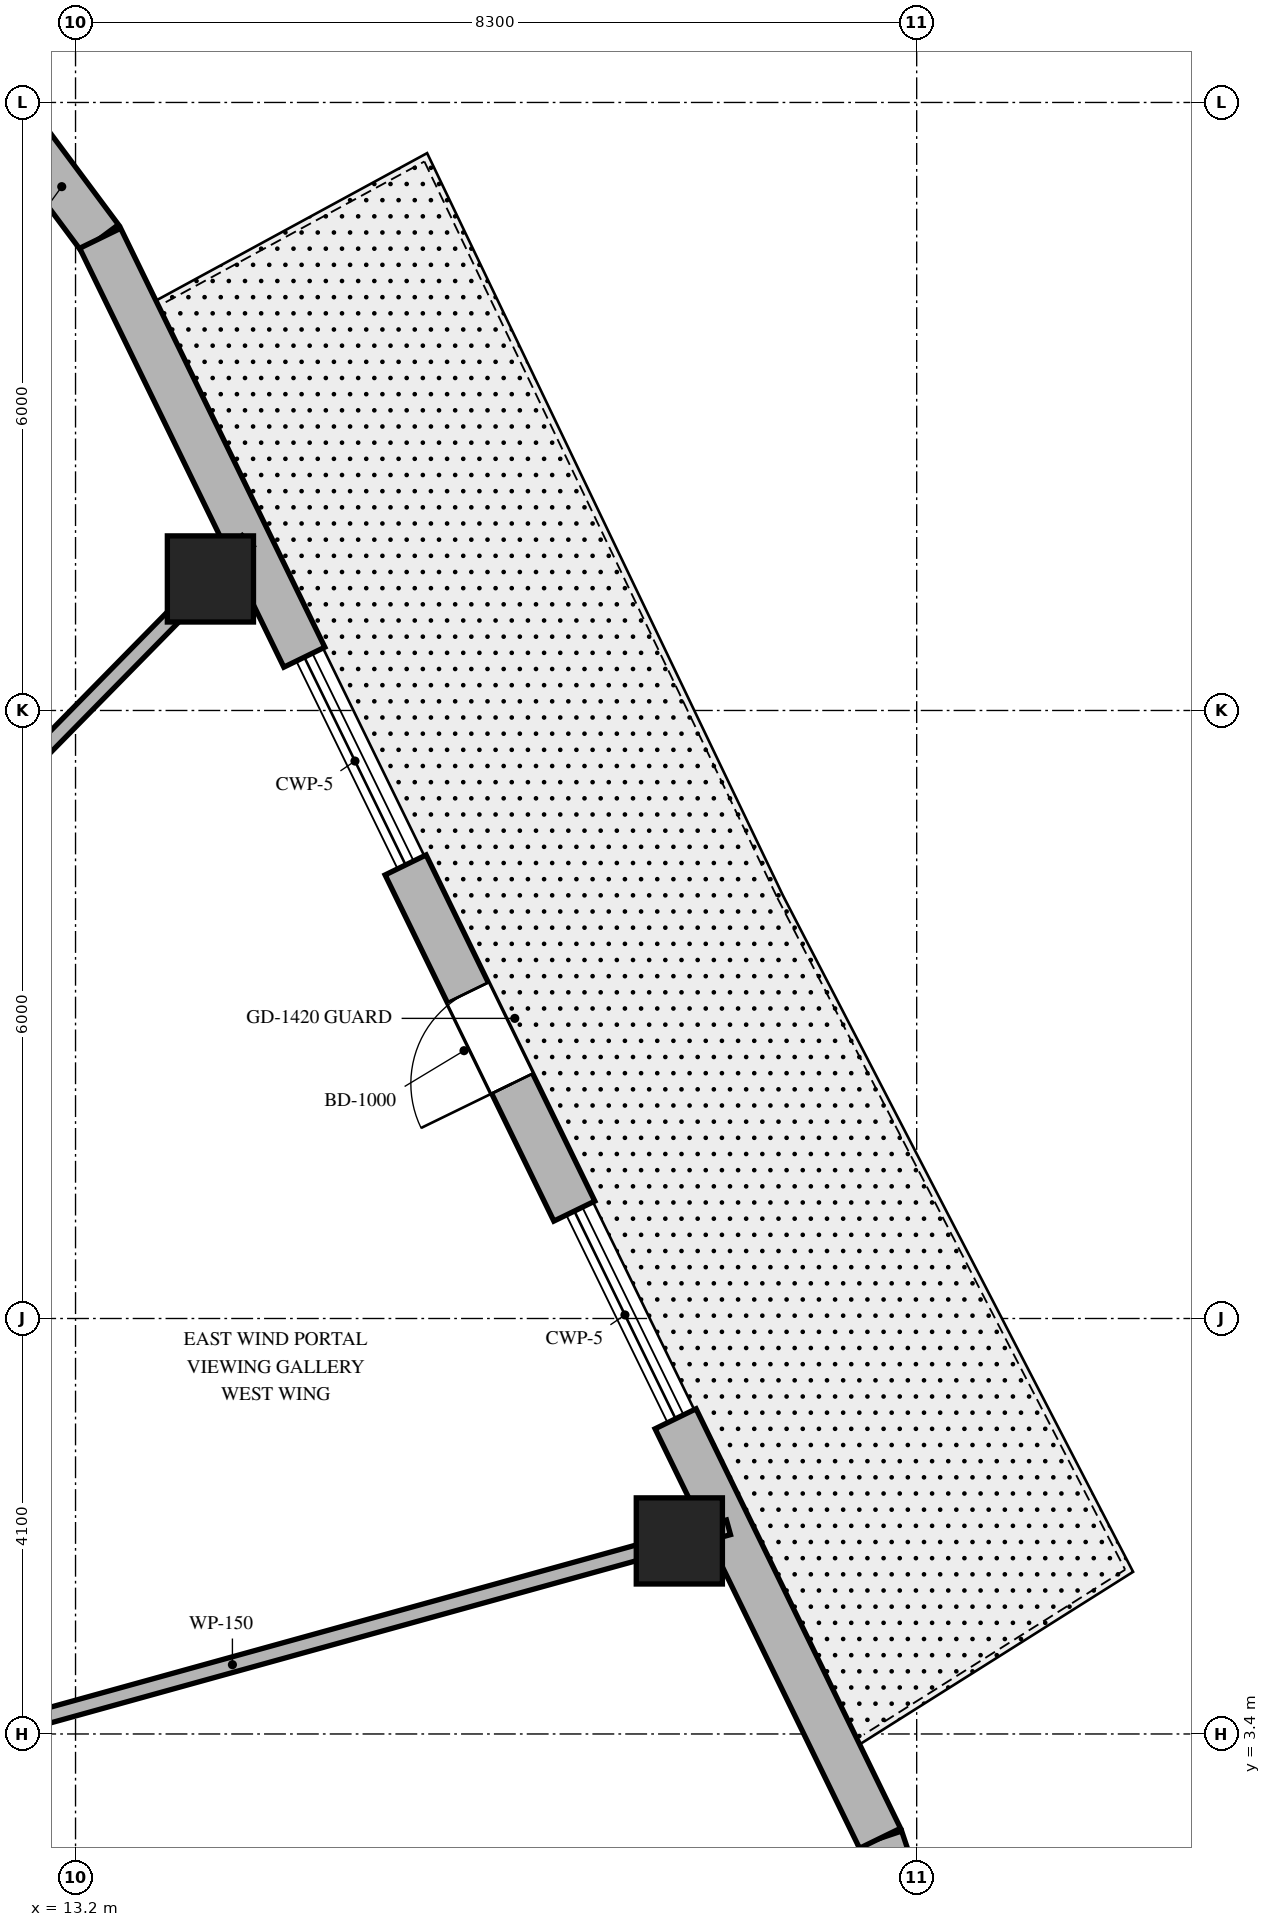
"""IFC4 building model, lengths in metres.
Left out: names, types, materials, properties, quantities, classifications, styles, units other than length and angle.
Written with IfcOpenShell. Run it as: python <this file> out.ifc"""

import sys

from ifc_helpers import new_model, si_unit, direction, frame, frame_2d, origin, origin_2d, place, context, subcontext, project, spatial, rectangle, extrude, element, fill, save


model = new_model("IFC4")
c1 = context("Model", 3, precision=1e-05, world=origin(), true_north=direction((0.0, 1.0)))
c2 = subcontext(c1, "Body", "Model", "MODEL_VIEW")
j1 = project(units=[si_unit("LENGTHUNIT", "METRE"), si_unit("PLANEANGLEUNIT", "RADIAN")], contexts=[c1])
p1 = place(None, origin())
s1 = spatial("IfcSite", under=j1, at=p1, CompositionType="ELEMENT")
p2 = place(p1, origin())
s2 = spatial("IfcBuilding", under=s1, at=p2, CompositionType="ELEMENT")
p3 = place(p2, frame((0.0, 0.0, 288.6)))
s3 = spatial("IfcBuildingStorey", under=s2, at=p3, CompositionType="ELEMENT", Elevation=288.6)
for number, where, z_axis, x_axis in (
    (1, (19.158, 5.305, 0.0), (0.0, 0.0, 1.0), (1.0, 0.0, 0.0)),
    (2, (14.531, 14.798, 0.0), (0.0, 0.0, 1.0), (1.0, 0.0, 0.0)),
):
    element("IfcColumn", number, at=place(p3, frame(where, z_axis=z_axis, x_axis=x_axis)), inside=s3, PredefinedType="COLUMN", context=c2, shape_type="SweptSolid", body=[
        extrude(rectangle(XDim=0.85, YDim=0.85, at=origin_2d()), origin(), (0.0, 0.0, 1.0), 4.5),
    ])
p4 = place(p3, frame((21.422, 1.522, 0.0), z_axis=(0.0, 0.0, 1.0), x_axis=(-0.316964162323, 0.94843751497, 0.0)))
e3 = element("IfcWall", 3, at=p4, inside=s3, PredefinedType="SOLIDWALL", context=c2, shape_type="SweptSolid", body=[
    extrude(rectangle(XDim=0.895, YDim=0.45, at=frame_2d((0.448, 0.0))), origin(), (0.0, 0.0, 1.0), 4.18),
])
p5 = place(p3, frame((13.443, 18.16, 0.0), z_axis=(0.0, 0.0, 1.0), x_axis=(-0.597042425808, 0.802209661987, 0.0)))
e4 = element("IfcWall", 4, at=p5, inside=s3, PredefinedType="SOLIDWALL", context=c2, shape_type="SweptSolid", body=[
    extrude(rectangle(XDim=1.27, YDim=0.45, at=frame_2d((0.635, 0.0))), origin(), (0.0, 0.0, 1.0), 4.18),
])
p6 = place(p3, frame((21.138, 2.371, 0.0), z_axis=(0.0, 0.0, 1.0), x_axis=(-0.438135313339, 0.898909031663, 0.0)))
e5 = element("IfcWall", 5, at=p6, inside=s3, PredefinedType="SOLIDWALL", context=c2, shape_type="SweptSolid", body=[
    extrude(rectangle(XDim=4.605, YDim=0.45, at=frame_2d((2.302, 0.0))), origin(), (0.0, 0.0, 1.0), 4.18),
])
p7 = place(p3, frame((18.122, 8.56, 0.0), z_axis=(0.0, 0.0, 1.0), x_axis=(-0.438118536586, 0.89891720859, 0.0)))
e6 = element("IfcWall", 6, at=p7, inside=s3, PredefinedType="SOLIDWALL", context=c2, shape_type="SweptSolid", body=[
    extrude(rectangle(XDim=3.8, YDim=0.45, at=frame_2d((1.9, 0.0))), origin(), (0.0, 0.0, 1.0), 4.18),
])
p8 = place(p7, frame((1.4, 0.0, 0.0)))
e7 = element("IfcOpeningElement", 7, at=p8, cuts=e6, PredefinedType="OPENING", context=c2, shape_type="SweptSolid", body=[
    extrude(rectangle(XDim=1.0, YDim=2.15, at=frame_2d((0.5, 1.075))), frame((0.0, 0.235, 0.0), z_axis=(0.0, -1.0, 0.0), x_axis=(1.0, 0.0, 0.0)), (0.0, 0.0, 1.0), 0.47),
])
p9 = place(p3, frame((15.458, 14.026, 0.0), z_axis=(0.0, 0.0, 1.0), x_axis=(-0.438101439155, 0.898925541416, 0.0)))
e8 = element("IfcWall", 8, at=p9, inside=s3, PredefinedType="SOLIDWALL", context=c2, shape_type="SweptSolid", body=[
    extrude(rectangle(XDim=4.599, YDim=0.45, at=frame_2d((2.299, 0.0))), origin(), (0.0, 0.0, 1.0), 4.18),
])
p10 = place(p3, frame((11.35, 3.143, 0.0), z_axis=(0.0, 0.0, 1.0), x_axis=(0.963731818141, 0.266872596386, 0.0)))
e9 = element("IfcWall", 9, at=p10, inside=s3, PredefinedType="PARTITIONING", context=c2, shape_type="SweptSolid", body=[
    extrude(rectangle(XDim=8.605, YDim=0.15, at=frame_2d((4.302, 0.0))), origin(), (0.0, 0.0, 1.0), 3.52),
])
p11 = place(p3, frame((9.672, 9.85, 0.0), z_axis=(0.0, 0.0, 1.0), x_axis=(0.700629771301, 0.713524998558, 0.0)))
e10 = element("IfcWall", 10, at=p11, inside=s3, PredefinedType="PARTITIONING", context=c2, shape_type="SweptSolid", body=[
    extrude(rectangle(XDim=7.459, YDim=0.15, at=frame_2d((3.73, 0.0))), origin(), (0.0, 0.0, 1.0), 3.52),
])
p12 = place(p8, origin())
e11 = element("IfcDoor", 11, at=p12, inside=s3, OperationType="SINGLE_SWING_LEFT", PredefinedType="DOOR", context=c2, shape_type="SweptSolid", body=[
    extrude(rectangle(XDim=1.0, YDim=2.15, at=frame_2d((0.5, 1.075))), frame((0.0, 0.025, 0.0), z_axis=(0.0, -1.0, 0.0), x_axis=(1.0, 0.0, 0.0)), (0.0, 0.0, 1.0), 0.05),
])
fill(e7, e11)
save(model, sys.argv[1])
